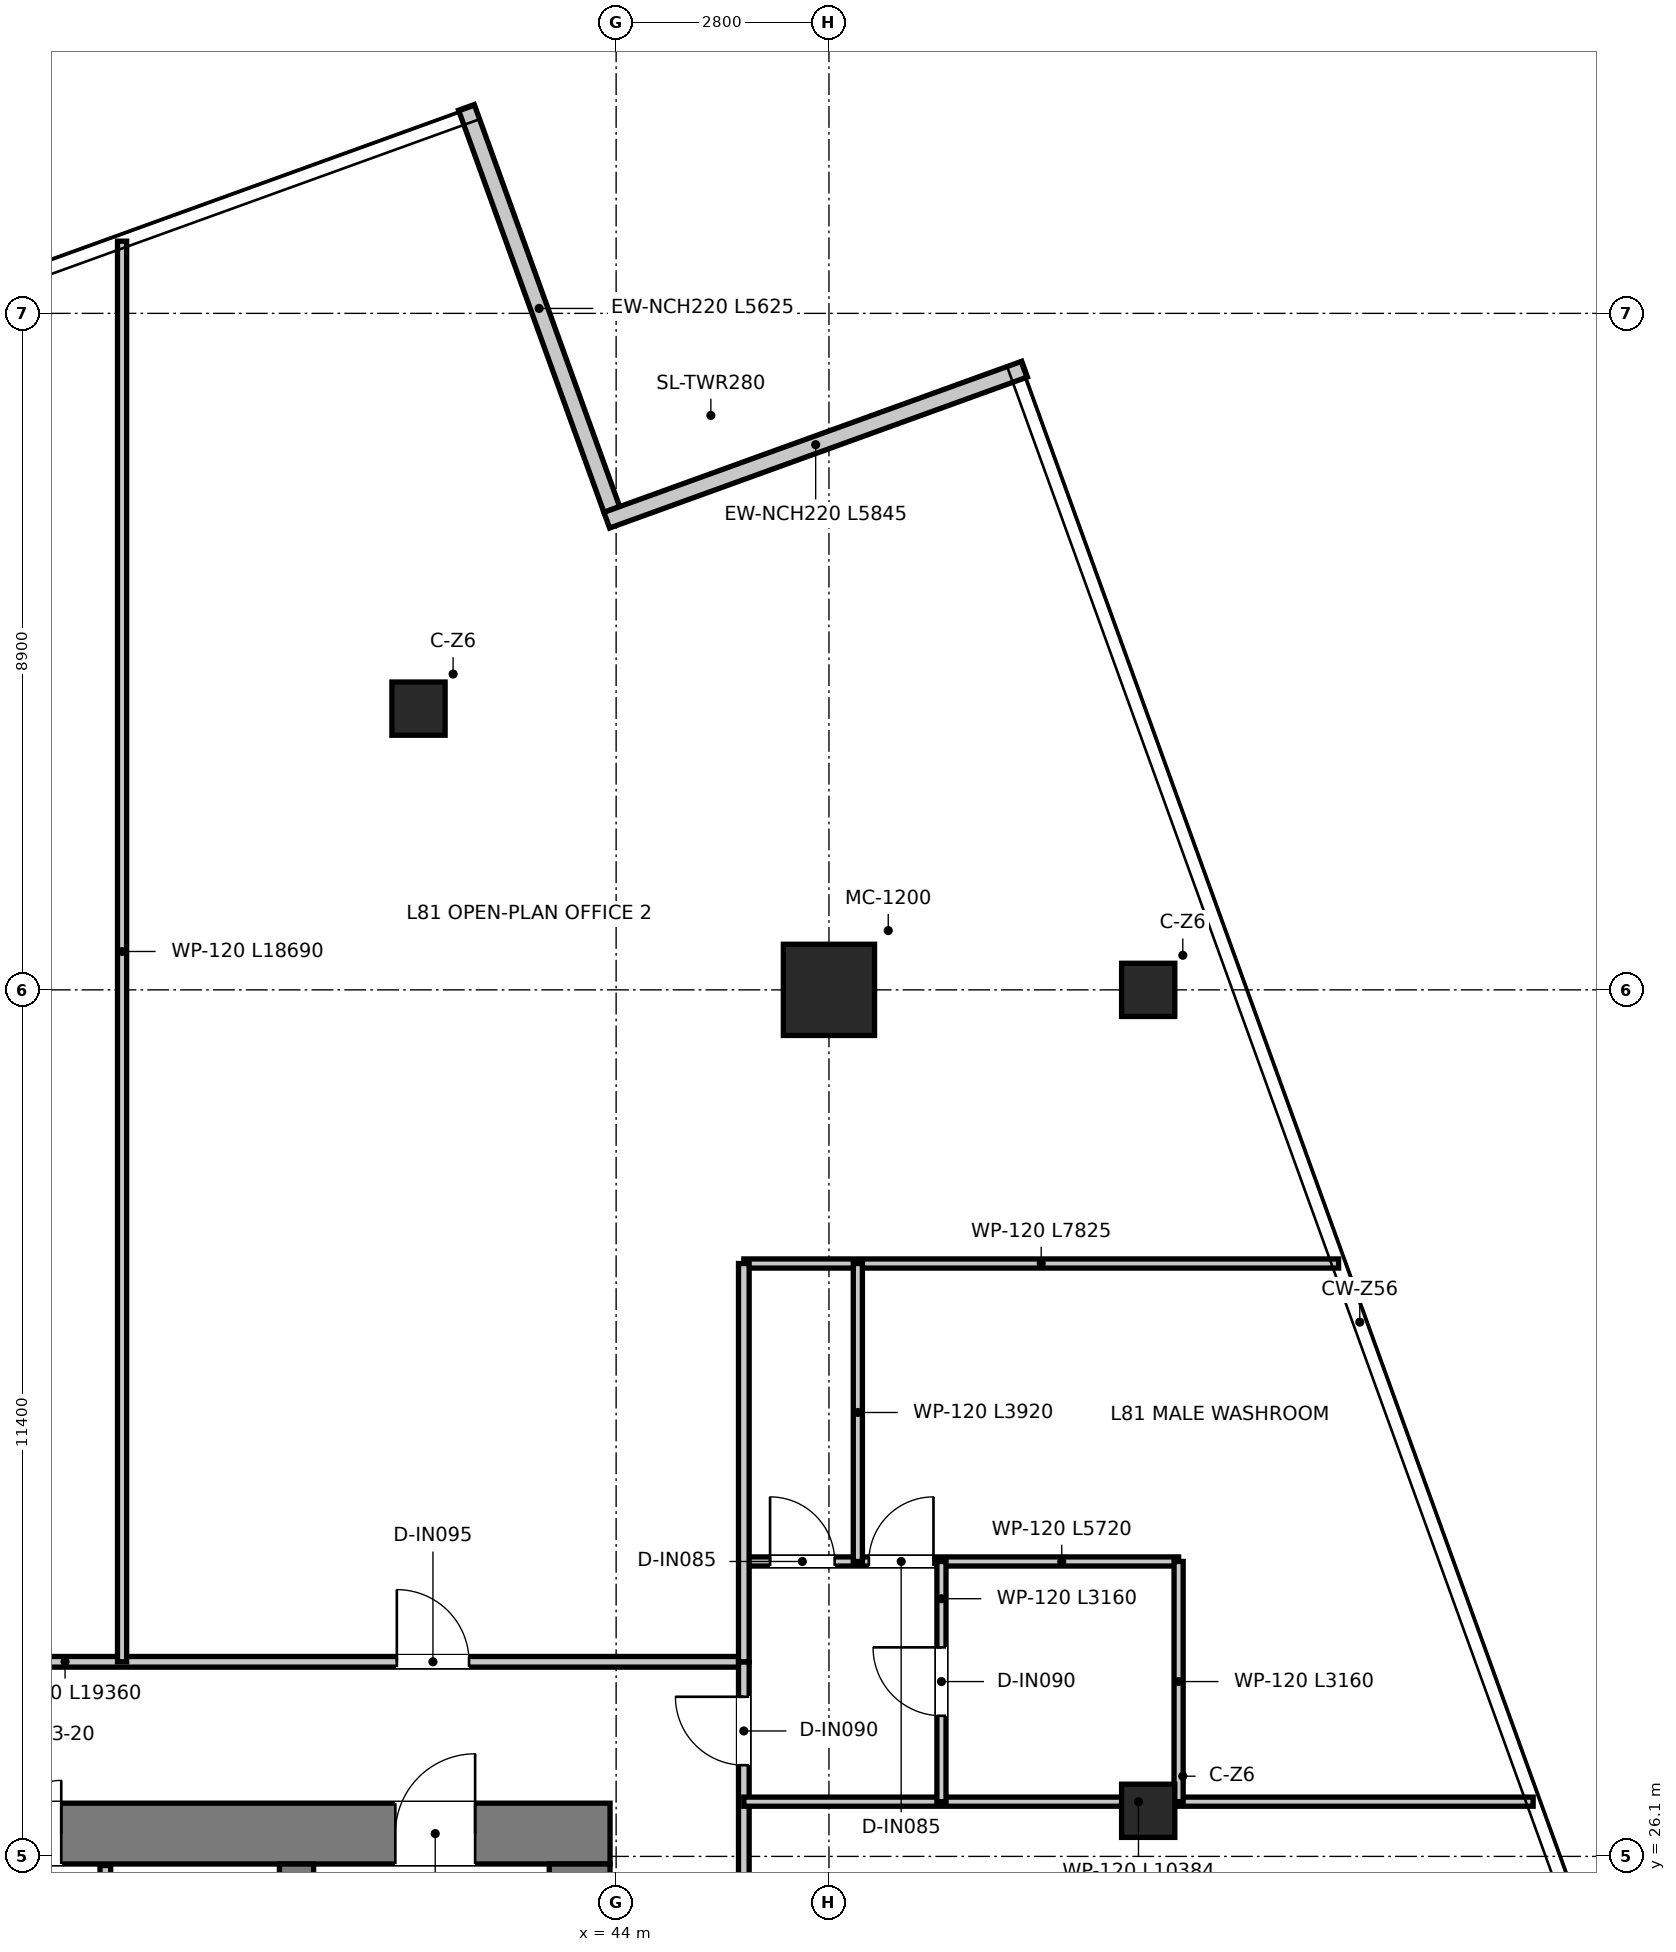
"""IFC4 building model, lengths in metres.
Left out: names, types, materials, properties, quantities, classifications, styles, units other than length and angle.
Written with IfcOpenShell. Run it as: python <this file> out.ifc"""

import sys

from ifc_helpers import new_model, si_unit, direction, frame, frame_2d, origin, origin_2d, place, context, subcontext, project, spatial, rectangle, extrude, source, transform, mapped, element, fill, save


model = new_model("IFC4")
c1 = context("Model", 3, precision=1e-05, world=origin(), true_north=direction((0.0, 1.0)))
c2 = subcontext(c1, "Body", "Model", "MODEL_VIEW")
j1 = project(units=[si_unit("LENGTHUNIT", "METRE"), si_unit("PLANEANGLEUNIT", "RADIAN")], contexts=[c1])
p1 = place(None, origin())
s1 = spatial("IfcSite", under=j1, at=p1, CompositionType="ELEMENT")
p2 = place(p1, origin())
s2 = spatial("IfcBuilding", under=s1, at=p2, CompositionType="ELEMENT")
p3 = place(p2, frame((0.0, 0.0, 331.65)))
s3 = spatial("IfcBuildingStorey", under=s2, at=p3, CompositionType="ELEMENT", Elevation=331.65)
p4 = place(p3, frame((28.08, 26.4, 0.0), z_axis=(0.0, 0.0, 1.0), x_axis=(1.0, 0.0, 0.0)))
e1 = element("IfcWall", 1, at=p4, inside=s3, PredefinedType="SHEAR", context=c2, shape_type="SweptSolid", body=[
    extrude(rectangle(XDim=15.84, YDim=0.8, at=frame_2d((7.92, 0.0))), origin(), (0.0, 0.0, 1.0), 3.95),
])
p5 = place(p4, frame((7.22, 0.0, 0.0)))
e2 = element("IfcOpeningElement", 2, at=p5, cuts=e1, PredefinedType="OPENING", context=c2, shape_type="SweptSolid", body=[
    extrude(rectangle(XDim=1.4, YDim=2.2, at=frame_2d((0.7, 1.1))), frame((0.0, 0.41, 0.0), z_axis=(0.0, -1.0, 0.0), x_axis=(1.0, 0.0, 0.0)), (0.0, 0.0, 1.0), 0.82),
])
p6 = place(p4, frame((1.775, 0.0, 0.0)))
e3 = element("IfcOpeningElement", 3, at=p6, cuts=e1, PredefinedType="OPENING", context=c2, shape_type="SweptSolid", body=[
    extrude(rectangle(XDim=1.05, YDim=2.1, at=frame_2d((0.525, 1.05))), frame((0.0, 0.41, 0.0), z_axis=(0.0, -1.0, 0.0), x_axis=(1.0, 0.0, 0.0)), (0.0, 0.0, 1.0), 0.82),
])
p7 = place(p4, frame((13.015, 0.0, 0.0)))
e4 = element("IfcOpeningElement", 4, at=p7, cuts=e1, PredefinedType="OPENING", context=c2, shape_type="SweptSolid", body=[
    extrude(rectangle(XDim=1.05, YDim=2.1, at=frame_2d((0.525, 1.05))), frame((0.0, 0.41, 0.0), z_axis=(0.0, -1.0, 0.0), x_axis=(1.0, 0.0, 0.0)), (0.0, 0.0, 1.0), 0.82),
])
p8 = place(p3, frame((43.52, 11.3, 0.0), z_axis=(0.0, 0.0, 1.0), x_axis=(0.0, 1.0, 0.0)))
e5 = element("IfcWall", 5, at=p8, inside=s3, PredefinedType="SHEAR", context=c2, shape_type="SweptSolid", body=[
    extrude(rectangle(XDim=14.7, YDim=0.8, at=frame_2d((7.35, 0.0))), origin(), (0.0, 0.0, 1.0), 3.95),
])
p9 = place(p3, frame((39.795, 13.22, 0.0), z_axis=(0.0, 0.0, 1.0), x_axis=(0.0, 1.0, 0.0)))
e6 = element("IfcWall", 6, at=p9, inside=s3, PredefinedType="SHEAR", context=c2, shape_type="SweptSolid", body=[
    extrude(rectangle(XDim=12.78, YDim=0.45, at=frame_2d((6.39, 0.0))), origin(), (0.0, 0.0, 1.0), 3.95),
])
p10 = place(p9, frame((10.58, 0.0, 0.0)))
e7 = element("IfcOpeningElement", 7, at=p10, cuts=e6, PredefinedType="OPENING", context=c2, shape_type="SweptSolid", body=[
    extrude(rectangle(XDim=1.1, YDim=2.15, at=frame_2d((0.55, 1.075))), frame((0.0, 0.235, 0.0), z_axis=(0.0, -1.0, 0.0), x_axis=(1.0, 0.0, 0.0)), (0.0, 0.0, 1.0), 0.47),
])
m1 = source(origin(), c2, "Body", "SweptSolid", [
    extrude(rectangle(XDim=1.2, YDim=1.2, at=origin_2d()), origin(), (0.0, 0.0, 1.0), 3.95),
])
p11 = place(p3, frame((46.8, 37.5, 0.0), z_axis=(0.0, 0.0, 1.0), x_axis=(1.0, 0.0, 0.0)))
e8 = element("IfcColumn", 8, at=p11, inside=s3, PredefinedType="USERDEFINED", context=c2, shape_type="MappedRepresentation", body=[
    mapped(m1, transform((0.0, 0.0, 0.0), x_axis=(1.0, 0.0, 0.0), y_axis=(0.0, 1.0, 0.0), z_axis=(0.0, 0.0, 1.0), scale=1.0)),
])
m2 = source(origin(), c2, "Body", "SweptSolid", [
    extrude(rectangle(XDim=0.7, YDim=0.7, at=origin_2d()), origin(), (0.0, 0.0, 1.0), 3.95),
])
for number, where, z_axis, x_axis in (
    (9, (41.4, 41.2, 0.0), (0.0, 0.0, 1.0), (1.0, 0.0, 0.0)),
    (10, (51.0, 37.5, 0.0), (0.0, 0.0, 1.0), (1.0, 0.0, 0.0)),
    (11, (51.0, 26.7, 0.0), (0.0, 0.0, 1.0), (1.0, 0.0, 0.0)),
):
    element("IfcColumn", number, at=place(p3, frame(where, z_axis=z_axis, x_axis=x_axis)), inside=s3, PredefinedType="COLUMN", context=c2, shape_type="MappedRepresentation", body=[
        mapped(m2, transform((0.0, 0.0, 0.0), x_axis=(1.0, 0.0, 0.0), y_axis=(0.0, 1.0, 0.0), z_axis=(0.0, 0.0, 1.0), scale=1.0)),
    ])
p12 = place(p3, frame((43.943, 43.82, 0.0), z_axis=(0.0, 0.0, 1.0), x_axis=(-0.339968670636, 0.940436761822, 0.0)))
e12 = element("IfcWall", 12, at=p12, inside=s3, PredefinedType="ELEMENTEDWALL", context=c2, shape_type="SweptSolid", body=[
    extrude(rectangle(XDim=5.625, YDim=0.22, at=frame_2d((2.812, 0.0))), origin(), (0.0, 0.0, 1.0), 3.67),
])
p13 = place(p3, frame((49.374, 45.666, 0.0), z_axis=(0.0, 0.0, 1.0), x_axis=(-0.940439315222, -0.339961607222, 0.0)))
e13 = element("IfcWall", 13, at=p13, inside=s3, PredefinedType="ELEMENTEDWALL", context=c2, shape_type="SweptSolid", body=[
    extrude(rectangle(XDim=5.845, YDim=0.22, at=frame_2d((2.922, 0.0))), origin(), (0.0, 0.0, 1.0), 3.67),
])
p14 = place(p3, frame((37.28, 20.2, 0.0), z_axis=(0.0, 0.0, 1.0), x_axis=(0.0, 1.0, 0.0)))
e14 = element("IfcWall", 14, at=p14, inside=s3, PredefinedType="PARTITIONING", context=c2, shape_type="SweptSolid", body=[
    extrude(rectangle(XDim=5.78, YDim=0.14, at=frame_2d((2.89, 0.0))), origin(), (0.0, 0.0, 1.0), 2.82),
])
p15 = place(p14, frame((0.95, 0.0, 0.0)))
e15 = element("IfcOpeningElement", 15, at=p15, cuts=e14, PredefinedType="OPENING", context=c2, shape_type="SweptSolid", body=[
    extrude(rectangle(XDim=1.1, YDim=2.15, at=frame_2d((0.55, 1.075))), frame((0.0, 0.08, 0.0), z_axis=(0.0, -1.0, 0.0), x_axis=(1.0, 0.0, 0.0)), (0.0, 0.0, 1.0), 0.16),
])
p16 = place(p3, frame((26.32, 28.66, 0.0), z_axis=(0.0, 0.0, 1.0), x_axis=(1.0, 0.0, 0.0)))
e16 = element("IfcWall", 16, at=p16, inside=s3, PredefinedType="PARTITIONING", context=c2, shape_type="SweptSolid", body=[
    extrude(rectangle(XDim=19.36, YDim=0.14, at=frame_2d((9.68, 0.0))), origin(), (0.0, 0.0, 1.0), 3.18),
])
p17 = place(p16, frame((5.115, 0.0, 0.0)))
e17 = element("IfcOpeningElement", 17, at=p17, cuts=e16, PredefinedType="OPENING", context=c2, shape_type="SweptSolid", body=[
    extrude(rectangle(XDim=0.95, YDim=2.1, at=frame_2d((0.475, 1.05))), frame((0.0, 0.08, 0.0), z_axis=(0.0, -1.0, 0.0), x_axis=(1.0, 0.0, 0.0)), (0.0, 0.0, 1.0), 0.16),
])
p18 = place(p16, frame((14.795, 0.0, 0.0)))
e18 = element("IfcOpeningElement", 18, at=p18, cuts=e16, PredefinedType="OPENING", context=c2, shape_type="SweptSolid", body=[
    extrude(rectangle(XDim=0.95, YDim=2.1, at=frame_2d((0.475, 1.05))), frame((0.0, 0.08, 0.0), z_axis=(0.0, -1.0, 0.0), x_axis=(1.0, 0.0, 0.0)), (0.0, 0.0, 1.0), 0.16),
])
p19 = place(p3, frame((45.68, 13.0, 0.0), z_axis=(0.0, 0.0, 1.0), x_axis=(0.0, 1.0, 0.0)))
e19 = element("IfcWall", 19, at=p19, inside=s3, PredefinedType="PARTITIONING", context=c2, shape_type="SweptSolid", body=[
    extrude(rectangle(XDim=15.66, YDim=0.14, at=frame_2d((7.83, 0.0))), origin(), (0.0, 0.0, 1.0), 3.13),
])
p20 = place(p19, frame((14.3, 0.0, 0.0)))
e20 = element("IfcOpeningElement", 20, at=p20, cuts=e19, PredefinedType="OPENING", context=c2, shape_type="SweptSolid", body=[
    extrude(rectangle(XDim=0.9, YDim=2.1, at=frame_2d((0.45, 1.05))), frame((0.0, 0.08, 0.0), z_axis=(0.0, -1.0, 0.0), x_axis=(1.0, 0.0, 0.0)), (0.0, 0.0, 1.0), 0.16),
])
p21 = place(p19, frame((5.8, 0.0, 0.0)))
e21 = element("IfcOpeningElement", 21, at=p21, cuts=e19, PredefinedType="OPENING", context=c2, shape_type="SweptSolid", body=[
    extrude(rectangle(XDim=0.9, YDim=2.1, at=frame_2d((0.45, 1.05))), frame((0.0, 0.08, 0.0), z_axis=(0.0, -1.0, 0.0), x_axis=(1.0, 0.0, 0.0)), (0.0, 0.0, 1.0), 0.16),
])
p22 = place(p19, frame((10.46, 0.0, 0.0)))
e22 = element("IfcOpeningElement", 22, at=p22, cuts=e19, PredefinedType="OPENING", context=c2, shape_type="SweptSolid", body=[
    extrude(rectangle(XDim=0.9, YDim=2.1, at=frame_2d((0.45, 1.05))), frame((0.0, 0.08, 0.0), z_axis=(0.0, -1.0, 0.0), x_axis=(1.0, 0.0, 0.0)), (0.0, 0.0, 1.0), 0.16),
])
p23 = place(p3, frame((45.68, 26.82, 0.0), z_axis=(0.0, 0.0, 1.0), x_axis=(1.0, 0.0, 0.0)))
e23 = element("IfcWall", 23, at=p23, inside=s3, PredefinedType="PARTITIONING", context=c2, shape_type="SweptSolid", body=[
    extrude(rectangle(XDim=10.384, YDim=0.12, at=frame_2d((5.192, 0.0))), origin(), (0.0, 0.0, 1.0), 3.13),
])
p24 = place(p3, frame((45.68, 33.9, 0.0), z_axis=(0.0, 0.0, 1.0), x_axis=(1.0, 0.0, 0.0)))
e24 = element("IfcWall", 24, at=p24, inside=s3, PredefinedType="PARTITIONING", context=c2, shape_type="SweptSolid", body=[
    extrude(rectangle(XDim=7.825, YDim=0.12, at=frame_2d((3.913, 0.0))), origin(), (0.0, 0.0, 1.0), 3.13),
])
p25 = place(p3, frame((45.68, 29.98, 0.0), z_axis=(0.0, 0.0, 1.0), x_axis=(1.0, 0.0, 0.0)))
e25 = element("IfcWall", 25, at=p25, inside=s3, PredefinedType="PARTITIONING", context=c2, shape_type="SweptSolid", body=[
    extrude(rectangle(XDim=5.72, YDim=0.12, at=frame_2d((2.86, 0.0))), origin(), (0.0, 0.0, 1.0), 3.13),
])
p26 = place(p25, frame((1.645, 0.0, 0.0)))
e26 = element("IfcOpeningElement", 26, at=p26, cuts=e25, PredefinedType="OPENING", context=c2, shape_type="SweptSolid", body=[
    extrude(rectangle(XDim=0.85, YDim=2.1, at=frame_2d((0.425, 1.05))), frame((0.0, 0.07, 0.0), z_axis=(0.0, -1.0, 0.0), x_axis=(1.0, 0.0, 0.0)), (0.0, 0.0, 1.0), 0.14),
])
p27 = place(p25, frame((0.345, 0.0, 0.0)))
e27 = element("IfcOpeningElement", 27, at=p27, cuts=e25, PredefinedType="OPENING", context=c2, shape_type="SweptSolid", body=[
    extrude(rectangle(XDim=0.85, YDim=2.1, at=frame_2d((0.425, 1.05))), frame((0.0, 0.07, 0.0), z_axis=(0.0, -1.0, 0.0), x_axis=(1.0, 0.0, 0.0)), (0.0, 0.0, 1.0), 0.14),
])
p28 = place(p3, frame((51.4, 26.82, 0.0), z_axis=(0.0, 0.0, 1.0), x_axis=(0.0, 1.0, 0.0)))
e28 = element("IfcWall", 28, at=p28, inside=s3, PredefinedType="PARTITIONING", context=c2, shape_type="SweptSolid", body=[
    extrude(rectangle(XDim=3.16, YDim=0.12, at=frame_2d((1.58, 0.0))), origin(), (0.0, 0.0, 1.0), 3.67),
])
p29 = place(p3, frame((48.28, 26.82, 0.0), z_axis=(0.0, 0.0, 1.0), x_axis=(0.0, 1.0, 0.0)))
e29 = element("IfcWall", 29, at=p29, inside=s3, PredefinedType="PARTITIONING", context=c2, shape_type="SweptSolid", body=[
    extrude(rectangle(XDim=3.16, YDim=0.12, at=frame_2d((1.58, 0.0))), origin(), (0.0, 0.0, 1.0), 3.18),
])
p30 = place(p29, frame((1.13, 0.0, 0.0)))
e30 = element("IfcOpeningElement", 30, at=p30, cuts=e29, PredefinedType="OPENING", context=c2, shape_type="SweptSolid", body=[
    extrude(rectangle(XDim=0.9, YDim=2.1, at=frame_2d((0.45, 1.05))), frame((0.0, 0.07, 0.0), z_axis=(0.0, -1.0, 0.0), x_axis=(1.0, 0.0, 0.0)), (0.0, 0.0, 1.0), 0.14),
])
p31 = place(p3, frame((47.18, 29.98, 0.0), z_axis=(0.0, 0.0, 1.0), x_axis=(0.0, 1.0, 0.0)))
e31 = element("IfcWall", 31, at=p31, inside=s3, PredefinedType="PARTITIONING", context=c2, shape_type="SweptSolid", body=[
    extrude(rectangle(XDim=3.92, YDim=0.12, at=frame_2d((1.96, 0.0))), origin(), (0.0, 0.0, 1.0), 3.37),
])
p32 = place(p3, frame((45.68, 28.66, 0.0), z_axis=(0.0, 0.0, 1.0), x_axis=(0.0, 1.0, 0.0)))
e32 = element("IfcWall", 32, at=p32, inside=s3, PredefinedType="PARTITIONING", context=c2, shape_type="SweptSolid", body=[
    extrude(rectangle(XDim=5.24, YDim=0.14, at=frame_2d((2.62, 0.0))), origin(), (0.0, 0.0, 1.0), 3.43),
])
p33 = place(p3, frame((37.5, 28.66, 0.0), z_axis=(0.0, 0.0, 1.0), x_axis=(0.0, 1.0, 0.0)))
e33 = element("IfcWall", 33, at=p33, inside=s3, PredefinedType="PARTITIONING", context=c2, shape_type="SweptSolid", body=[
    extrude(rectangle(XDim=18.69, YDim=0.12, at=frame_2d((9.345, 0.0))), origin(), (0.0, 0.0, 1.0), 3.13),
])
p34 = place(p5, origin())
e34 = element("IfcDoor", 34, at=p34, inside=s3, OperationType="DOUBLE_DOOR_SINGLE_SWING", PredefinedType="DOOR", context=c2, shape_type="SweptSolid", body=[
    extrude(rectangle(XDim=1.4, YDim=2.2, at=frame_2d((0.7, 1.1))), frame((0.0, 0.025, 0.0), z_axis=(0.0, -1.0, 0.0), x_axis=(1.0, 0.0, 0.0)), (0.0, 0.0, 1.0), 0.05),
])
fill(e2, e34)
p35 = place(p7, origin())
e35 = element("IfcDoor", 35, at=p35, inside=s3, OperationType="SINGLE_SWING_RIGHT", PredefinedType="DOOR", context=c2, shape_type="SweptSolid", body=[
    extrude(rectangle(XDim=1.05, YDim=2.1, at=frame_2d((0.525, 1.05))), frame((0.0, 0.025, 0.0), z_axis=(0.0, -1.0, 0.0), x_axis=(1.0, 0.0, 0.0)), (0.0, 0.0, 1.0), 0.05),
])
fill(e4, e35)
p36 = place(p20, origin())
e36 = element("IfcDoor", 36, at=p36, inside=s3, OperationType="SINGLE_SWING_RIGHT", PredefinedType="DOOR", context=c2, shape_type="SweptSolid", body=[
    extrude(rectangle(XDim=0.9, YDim=2.1, at=frame_2d((0.45, 1.05))), frame((0.0, 0.025, 0.0), z_axis=(0.0, -1.0, 0.0), x_axis=(1.0, 0.0, 0.0)), (0.0, 0.0, 1.0), 0.05),
])
fill(e20, e36)
p37 = place(p26, origin())
e37 = element("IfcDoor", 37, at=p37, inside=s3, OperationType="SINGLE_SWING_RIGHT", PredefinedType="DOOR", context=c2, shape_type="SweptSolid", body=[
    extrude(rectangle(XDim=0.85, YDim=2.1, at=frame_2d((0.425, 1.05))), frame((0.0, 0.025, 0.0), z_axis=(0.0, -1.0, 0.0), x_axis=(1.0, 0.0, 0.0)), (0.0, 0.0, 1.0), 0.05),
])
fill(e26, e37)
p38 = place(p27, origin())
e38 = element("IfcDoor", 38, at=p38, inside=s3, OperationType="SINGLE_SWING_LEFT", PredefinedType="DOOR", context=c2, shape_type="SweptSolid", body=[
    extrude(rectangle(XDim=0.85, YDim=2.1, at=frame_2d((0.425, 1.05))), frame((0.0, 0.025, 0.0), z_axis=(0.0, -1.0, 0.0), x_axis=(1.0, 0.0, 0.0)), (0.0, 0.0, 1.0), 0.05),
])
fill(e27, e38)
p39 = place(p30, origin())
e39 = element("IfcDoor", 39, at=p39, inside=s3, OperationType="SINGLE_SWING_RIGHT", PredefinedType="DOOR", context=c2, shape_type="SweptSolid", body=[
    extrude(rectangle(XDim=0.9, YDim=2.1, at=frame_2d((0.45, 1.05))), frame((0.0, 0.025, 0.0), z_axis=(0.0, -1.0, 0.0), x_axis=(1.0, 0.0, 0.0)), (0.0, 0.0, 1.0), 0.05),
])
fill(e30, e39)
p40 = place(p18, origin())
e40 = element("IfcDoor", 40, at=p40, inside=s3, OperationType="SINGLE_SWING_LEFT", PredefinedType="DOOR", context=c2, shape_type="SweptSolid", body=[
    extrude(rectangle(XDim=0.95, YDim=2.1, at=frame_2d((0.475, 1.05))), frame((0.0, 0.025, 0.0), z_axis=(0.0, -1.0, 0.0), x_axis=(1.0, 0.0, 0.0)), (0.0, 0.0, 1.0), 0.05),
])
fill(e18, e40)
save(model, sys.argv[1])
